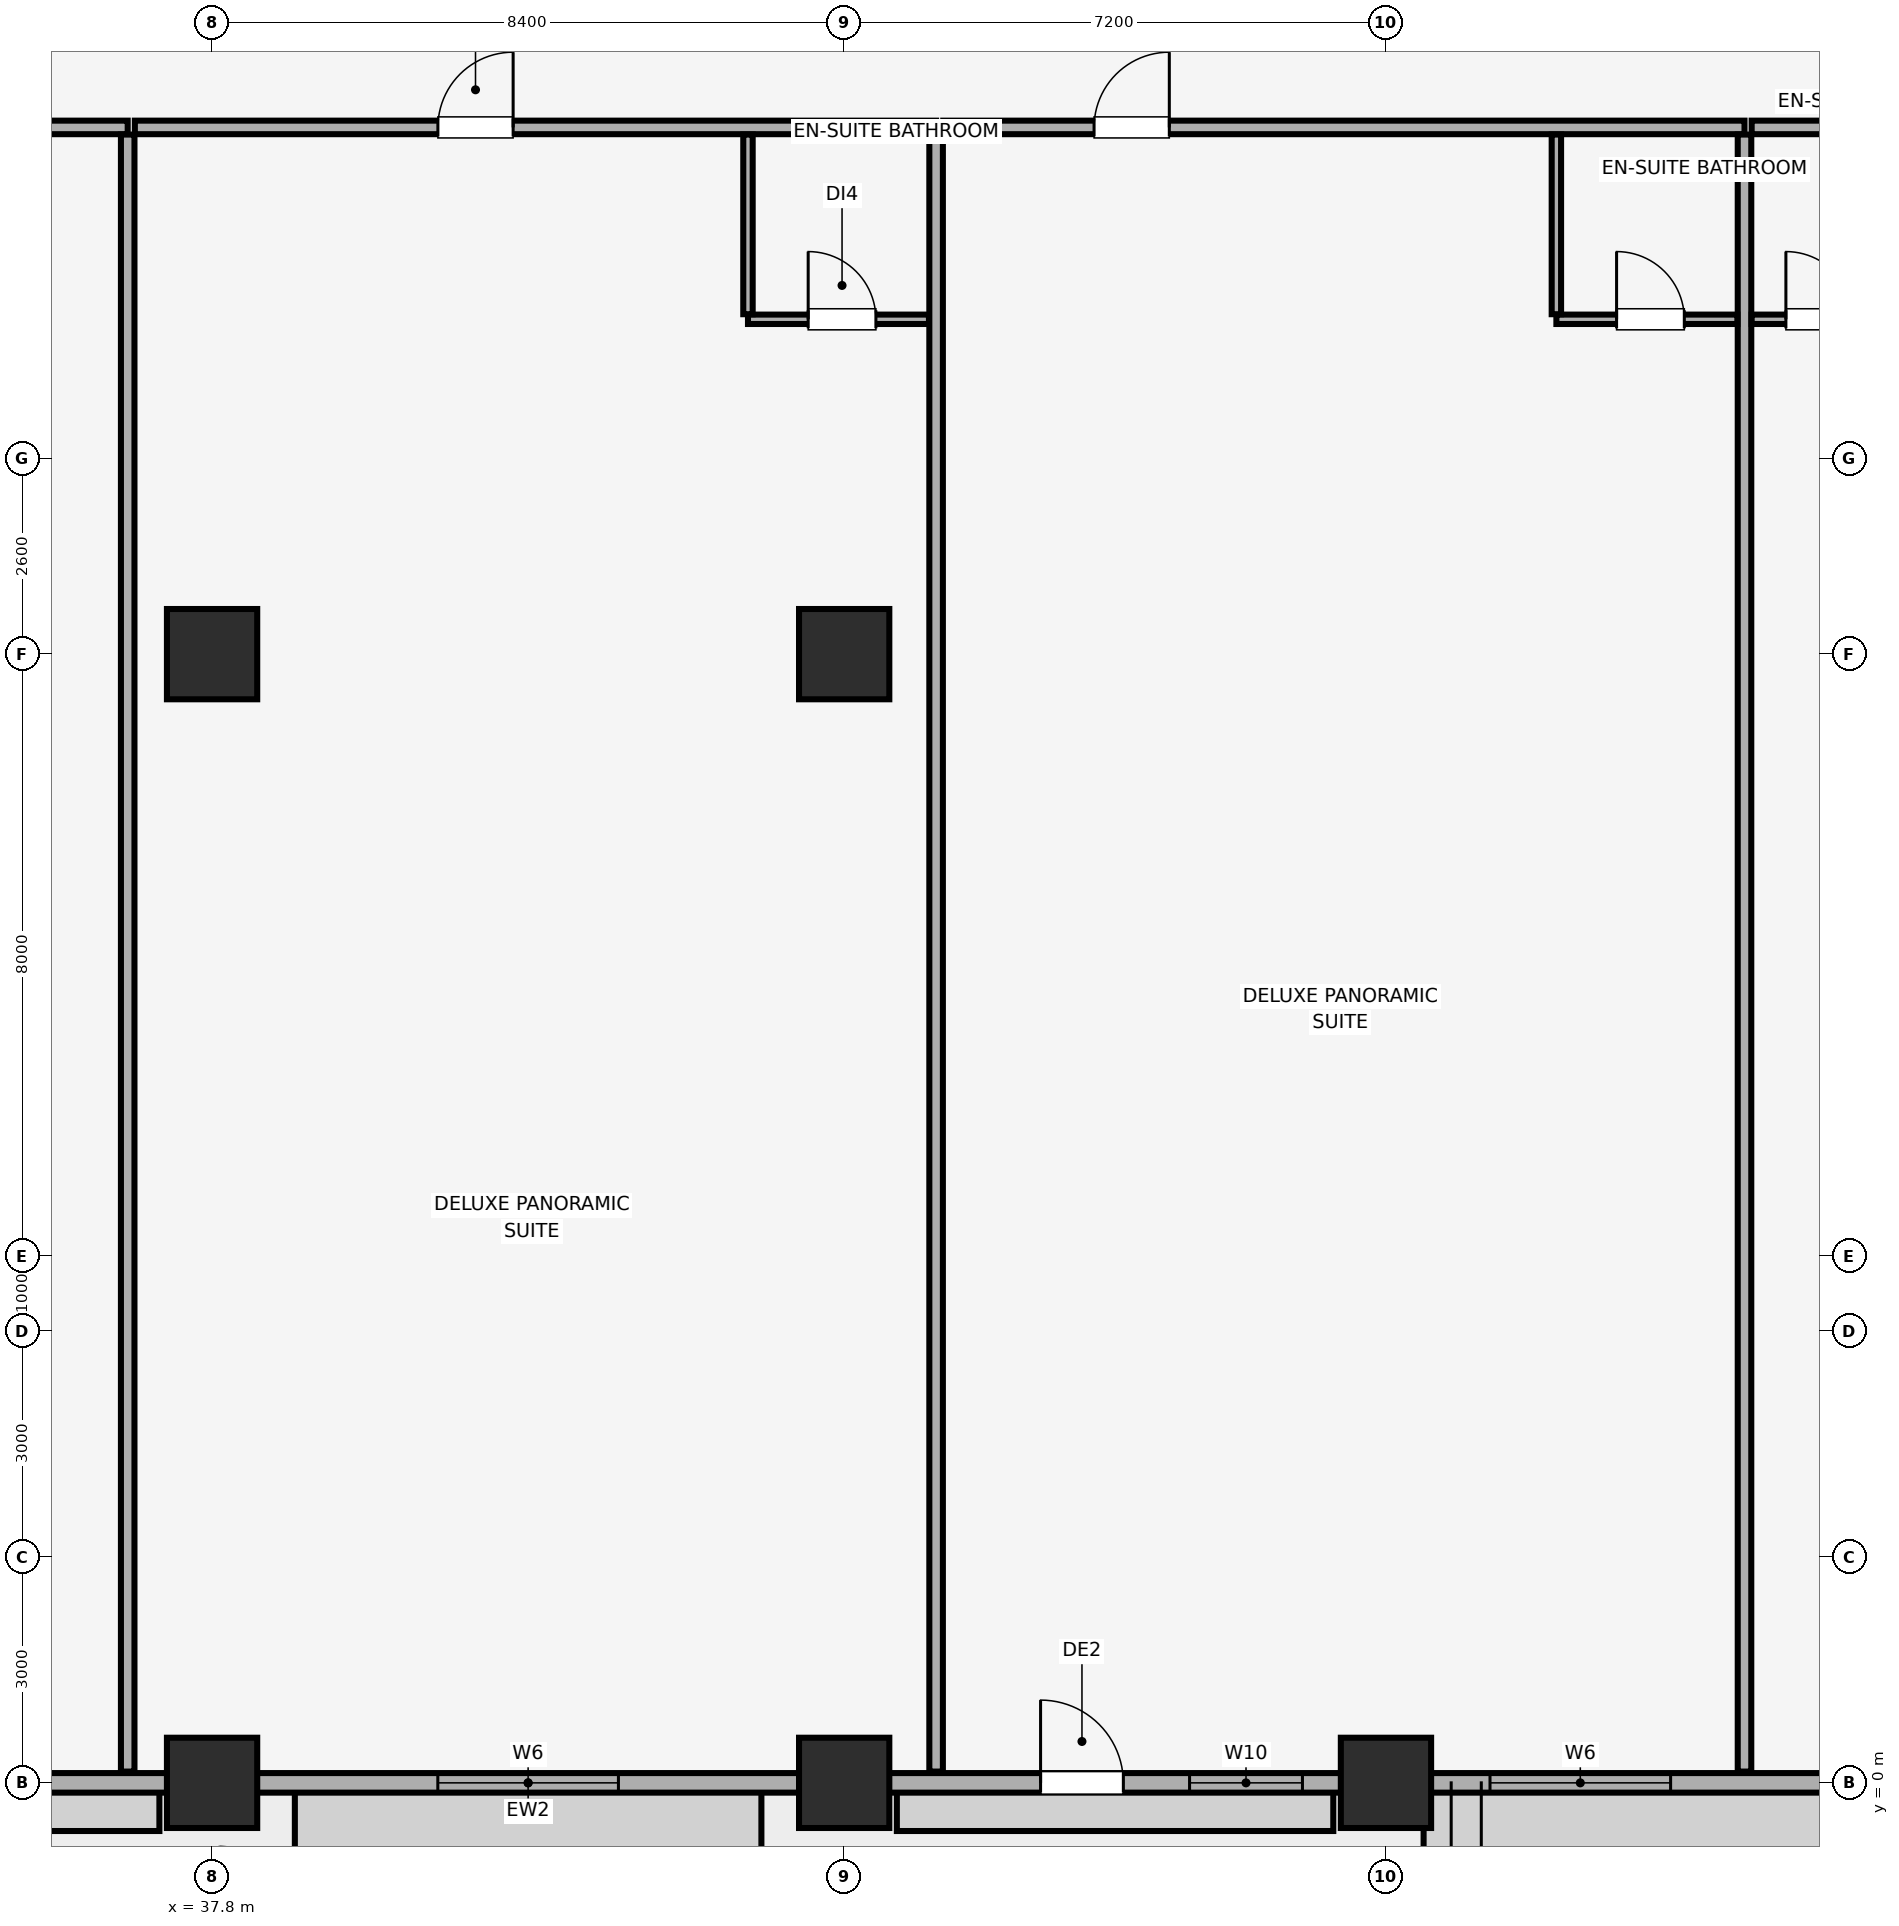
"""IFC4 building model, lengths in metres.
Left out: names, types, materials, properties, quantities, classifications, styles, units other than length and angle.
Written with IfcOpenShell. Run it as: python <this file> out.ifc"""

import sys

from ifc_helpers import new_model, si_unit, direction, frame, frame_2d, origin, origin_2d, place, context, subcontext, project, spatial, rectangle, extrude, element, fill, save


model = new_model("IFC4")
c1 = context("Model", 3, precision=1e-05, world=origin(), true_north=direction((0.0, 1.0)))
c2 = subcontext(c1, "Body", "Model", "MODEL_VIEW")
j1 = project(units=[si_unit("LENGTHUNIT", "METRE"), si_unit("PLANEANGLEUNIT", "RADIAN")], contexts=[c1])
p1 = place(None, origin())
s1 = spatial("IfcSite", under=j1, at=p1, CompositionType="ELEMENT")
p2 = place(p1, origin())
s2 = spatial("IfcBuilding", under=s1, at=p2, CompositionType="ELEMENT")
p3 = place(p2, frame((0.0, 0.0, 104.3)))
s3 = spatial("IfcBuildingStorey", under=s2, at=p3, CompositionType="ELEMENT", Elevation=104.3)
for number, where, z_axis, x_axis in (
    (1, (37.8, 0.0, 0.0), (0.0, 0.0, 1.0), (1.0, 0.0, 0.0)),
    (2, (46.2, 0.0, 0.0), (0.0, 0.0, 1.0), (1.0, 0.0, 0.0)),
    (3, (53.4, 0.0, 0.0), (0.0, 0.0, 1.0), (1.0, 0.0, 0.0)),
    (4, (37.8, 15.0, 0.0), (0.0, 0.0, 1.0), (1.0, 0.0, 0.0)),
    (5, (46.2, 15.0, 0.0), (0.0, 0.0, 1.0), (1.0, 0.0, 0.0)),
):
    element("IfcColumn", number, at=place(p3, frame(where, z_axis=z_axis, x_axis=x_axis)), inside=s3, PredefinedType="COLUMN", context=c2, shape_type="SweptSolid", body=[
        extrude(rectangle(XDim=1.2, YDim=1.2, at=origin_2d()), origin(), (0.0, 0.0, 1.0), 3.51),
    ])
p4 = place(p3, frame((4.2, 0.0, 0.0), z_axis=(0.0, 0.0, 1.0), x_axis=(1.0, 0.0, 0.0)))
e6 = element("IfcWall", 6, at=p4, inside=s3, PredefinedType="SOLIDWALL", context=c2, shape_type="SweptSolid", body=[
    extrude(rectangle(XDim=75.6, YDim=0.26, at=frame_2d((37.8, 0.0))), origin(), (0.0, 0.0, 1.0), 2.56),
])
p5 = place(p4, frame((22.948, 0.0, 0.0)))
e7 = element("IfcOpeningElement", 7, at=p5, cuts=e6, PredefinedType="OPENING", context=c2, shape_type="SweptSolid", body=[
    extrude(rectangle(XDim=1.1, YDim=2.15, at=frame_2d((0.55, 1.075))), frame((0.0, 0.14, 0.0), z_axis=(0.0, -1.0, 0.0), x_axis=(1.0, 0.0, 0.0)), (0.0, 0.0, 1.0), 0.28),
])
p6 = place(p4, frame((44.61, 0.0, 0.0)))
e8 = element("IfcOpeningElement", 8, at=p6, cuts=e6, PredefinedType="OPENING", context=c2, shape_type="SweptSolid", body=[
    extrude(rectangle(XDim=1.1, YDim=2.15, at=frame_2d((0.55, 1.075))), frame((0.0, 0.14, 0.0), z_axis=(0.0, -1.0, 0.0), x_axis=(1.0, 0.0, 0.0)), (0.0, 0.0, 1.0), 0.28),
])
p7 = place(p4, frame((66.272, 0.0, 0.0)))
e9 = element("IfcOpeningElement", 9, at=p7, cuts=e6, PredefinedType="OPENING", context=c2, shape_type="SweptSolid", body=[
    extrude(rectangle(XDim=1.1, YDim=2.15, at=frame_2d((0.55, 1.075))), frame((0.0, 0.14, 0.0), z_axis=(0.0, -1.0, 0.0), x_axis=(1.0, 0.0, 0.0)), (0.0, 0.0, 1.0), 0.28),
])
p8 = place(p4, frame((1.035, 0.0, 0.85)))
e10 = element("IfcOpeningElement", 10, at=p8, cuts=e6, PredefinedType="OPENING", context=c2, shape_type="SweptSolid", body=[
    extrude(rectangle(XDim=2.4, YDim=1.5, at=frame_2d((1.2, 0.75))), frame((0.0, 0.14, 0.0), z_axis=(0.0, -1.0, 0.0), x_axis=(1.0, 0.0, 0.0)), (0.0, 0.0, 1.0), 0.28),
])
p9 = place(p4, frame((6.896, 0.0, 0.85)))
e11 = element("IfcOpeningElement", 11, at=p9, cuts=e6, PredefinedType="OPENING", context=c2, shape_type="SweptSolid", body=[
    extrude(rectangle(XDim=2.4, YDim=1.5, at=frame_2d((1.2, 0.75))), frame((0.0, 0.14, 0.0), z_axis=(0.0, -1.0, 0.0), x_axis=(1.0, 0.0, 0.0)), (0.0, 0.0, 1.0), 0.28),
])
p10 = place(p4, frame((14.4, 0.0, 0.85)))
e12 = element("IfcOpeningElement", 12, at=p10, cuts=e6, PredefinedType="OPENING", context=c2, shape_type="SweptSolid", body=[
    extrude(rectangle(XDim=2.4, YDim=1.5, at=frame_2d((1.2, 0.75))), frame((0.0, 0.14, 0.0), z_axis=(0.0, -1.0, 0.0), x_axis=(1.0, 0.0, 0.0)), (0.0, 0.0, 1.0), 0.28),
])
p11 = place(p4, frame((28.439, 0.0, 0.85)))
e13 = element("IfcOpeningElement", 13, at=p11, cuts=e6, PredefinedType="OPENING", context=c2, shape_type="SweptSolid", body=[
    extrude(rectangle(XDim=2.4, YDim=1.5, at=frame_2d((1.2, 0.75))), frame((0.0, 0.14, 0.0), z_axis=(0.0, -1.0, 0.0), x_axis=(1.0, 0.0, 0.0)), (0.0, 0.0, 1.0), 0.28),
])
p12 = place(p4, frame((36.6, 0.0, 0.85)))
e14 = element("IfcOpeningElement", 14, at=p12, cuts=e6, PredefinedType="OPENING", context=c2, shape_type="SweptSolid", body=[
    extrude(rectangle(XDim=2.4, YDim=1.5, at=frame_2d((1.2, 0.75))), frame((0.0, 0.14, 0.0), z_axis=(0.0, -1.0, 0.0), x_axis=(1.0, 0.0, 0.0)), (0.0, 0.0, 1.0), 0.28),
])
p13 = place(p4, frame((46.59, 0.0, 0.85)))
e15 = element("IfcOpeningElement", 15, at=p13, cuts=e6, PredefinedType="OPENING", context=c2, shape_type="SweptSolid", body=[
    extrude(rectangle(XDim=1.5, YDim=1.4, at=frame_2d((0.75, 0.7))), frame((0.0, 0.14, 0.0), z_axis=(0.0, -1.0, 0.0), x_axis=(1.0, 0.0, 0.0)), (0.0, 0.0, 1.0), 0.28),
])
p14 = place(p4, frame((50.583, 0.0, 0.85)))
e16 = element("IfcOpeningElement", 16, at=p14, cuts=e6, PredefinedType="OPENING", context=c2, shape_type="SweptSolid", body=[
    extrude(rectangle(XDim=2.4, YDim=1.5, at=frame_2d((1.2, 0.75))), frame((0.0, 0.14, 0.0), z_axis=(0.0, -1.0, 0.0), x_axis=(1.0, 0.0, 0.0)), (0.0, 0.0, 1.0), 0.28),
])
p15 = place(p4, frame((58.8, 0.0, 0.85)))
e17 = element("IfcOpeningElement", 17, at=p15, cuts=e6, PredefinedType="OPENING", context=c2, shape_type="SweptSolid", body=[
    extrude(rectangle(XDim=2.4, YDim=1.5, at=frame_2d((1.2, 0.75))), frame((0.0, 0.14, 0.0), z_axis=(0.0, -1.0, 0.0), x_axis=(1.0, 0.0, 0.0)), (0.0, 0.0, 1.0), 0.28),
])
p16 = place(p4, frame((68.221, 0.0, 0.85)))
e18 = element("IfcOpeningElement", 18, at=p16, cuts=e6, PredefinedType="OPENING", context=c2, shape_type="SweptSolid", body=[
    extrude(rectangle(XDim=1.5, YDim=1.4, at=frame_2d((0.75, 0.7))), frame((0.0, 0.14, 0.0), z_axis=(0.0, -1.0, 0.0), x_axis=(1.0, 0.0, 0.0)), (0.0, 0.0, 1.0), 0.28),
])
p17 = place(p4, frame((72.165, 0.0, 0.85)))
e19 = element("IfcOpeningElement", 19, at=p17, cuts=e6, PredefinedType="OPENING", context=c2, shape_type="SweptSolid", body=[
    extrude(rectangle(XDim=2.4, YDim=1.5, at=frame_2d((1.2, 0.75))), frame((0.0, 0.14, 0.0), z_axis=(0.0, -1.0, 0.0), x_axis=(1.0, 0.0, 0.0)), (0.0, 0.0, 1.0), 0.28),
])
p18 = place(p3, frame((26.031, 22.0, 0.0), z_axis=(0.0, 0.0, 1.0), x_axis=(1.0, 0.0, 0.0)))
e20 = element("IfcWall", 20, at=p18, inside=s3, PredefinedType="PARTITIONING", context=c2, shape_type="SweptSolid", body=[
    extrude(rectangle(XDim=10.648, YDim=0.18, at=frame_2d((5.324, 0.0))), origin(), (0.0, 0.0, 1.0), 3.51),
])
p19 = place(p18, frame((7.499, 0.0, 0.0)))
e21 = element("IfcOpeningElement", 21, at=p19, cuts=e20, PredefinedType="OPENING", context=c2, shape_type="SweptSolid", body=[
    extrude(rectangle(XDim=1.0, YDim=2.15, at=frame_2d((0.5, 1.075))), frame((0.0, 0.1, 0.0), z_axis=(0.0, -1.0, 0.0), x_axis=(1.0, 0.0, 0.0)), (0.0, 0.0, 1.0), 0.2),
])
p20 = place(p3, frame((36.679, 0.15, 0.0), z_axis=(0.0, 0.0, 1.0), x_axis=(0.0, 1.0, 0.0)))
e22 = element("IfcWall", 22, at=p20, inside=s3, PredefinedType="PARTITIONING", context=c2, shape_type="SweptSolid", body=[
    extrude(rectangle(XDim=21.755, YDim=0.18, at=frame_2d((10.877, 0.0))), origin(), (0.0, 0.0, 1.0), 3.51),
])
p21 = place(p3, frame((36.774, 22.0, 0.0), z_axis=(0.0, 0.0, 1.0), x_axis=(1.0, 0.0, 0.0)))
e23 = element("IfcWall", 23, at=p21, inside=s3, PredefinedType="PARTITIONING", context=c2, shape_type="SweptSolid", body=[
    extrude(rectangle(XDim=10.648, YDim=0.18, at=frame_2d((5.324, 0.0))), origin(), (0.0, 0.0, 1.0), 3.51),
])
p22 = place(p21, frame((4.027, 0.0, 0.0)))
e24 = element("IfcOpeningElement", 24, at=p22, cuts=e23, PredefinedType="OPENING", context=c2, shape_type="SweptSolid", body=[
    extrude(rectangle(XDim=1.0, YDim=2.15, at=frame_2d((0.5, 1.075))), frame((0.0, 0.1, 0.0), z_axis=(0.0, -1.0, 0.0), x_axis=(1.0, 0.0, 0.0)), (0.0, 0.0, 1.0), 0.2),
])
p23 = place(p3, frame((47.422, 0.15, 0.0), z_axis=(0.0, 0.0, 1.0), x_axis=(0.0, 1.0, 0.0)))
e25 = element("IfcWall", 25, at=p23, inside=s3, PredefinedType="PARTITIONING", context=c2, shape_type="SweptSolid", body=[
    extrude(rectangle(XDim=21.755, YDim=0.18, at=frame_2d((10.877, 0.0))), origin(), (0.0, 0.0, 1.0), 3.51),
])
p24 = place(p3, frame((44.922, 19.45, 0.0), z_axis=(0.0, 0.0, 1.0), x_axis=(1.0, 0.0, 0.0)))
e26 = element("IfcWall", 26, at=p24, inside=s3, PredefinedType="PARTITIONING", context=c2, shape_type="SweptSolid", body=[
    extrude(rectangle(XDim=2.405, YDim=0.125, at=frame_2d((1.203, 0.0))), origin(), (0.0, 0.0, 1.0), 3.51),
])
p25 = place(p24, frame((0.8, 0.0, 0.0)))
e27 = element("IfcOpeningElement", 27, at=p25, cuts=e26, PredefinedType="OPENING", context=c2, shape_type="SweptSolid", body=[
    extrude(rectangle(XDim=0.9, YDim=2.1, at=frame_2d((0.45, 1.05))), frame((0.0, 0.073, 0.0), z_axis=(0.0, -1.0, 0.0), x_axis=(1.0, 0.0, 0.0)), (0.0, 0.0, 1.0), 0.145),
])
p26 = place(p3, frame((44.922, 19.518, 0.0), z_axis=(0.0, 0.0, 1.0), x_axis=(0.0, 1.0, 0.0)))
e28 = element("IfcWall", 28, at=p26, inside=s3, PredefinedType="PARTITIONING", context=c2, shape_type="SweptSolid", body=[
    extrude(rectangle(XDim=2.387, YDim=0.125, at=frame_2d((1.194, 0.0))), origin(), (0.0, 0.0, 1.0), 3.51),
])
p27 = place(p3, frame((47.517, 22.0, 0.0), z_axis=(0.0, 0.0, 1.0), x_axis=(1.0, 0.0, 0.0)))
e29 = element("IfcWall", 29, at=p27, inside=s3, PredefinedType="PARTITIONING", context=c2, shape_type="SweptSolid", body=[
    extrude(rectangle(XDim=10.648, YDim=0.18, at=frame_2d((5.324, 0.0))), origin(), (0.0, 0.0, 1.0), 3.51),
])
p28 = place(p27, frame((2.004, 0.0, 0.0)))
e30 = element("IfcOpeningElement", 30, at=p28, cuts=e29, PredefinedType="OPENING", context=c2, shape_type="SweptSolid", body=[
    extrude(rectangle(XDim=1.0, YDim=2.15, at=frame_2d((0.5, 1.075))), frame((0.0, 0.1, 0.0), z_axis=(0.0, -1.0, 0.0), x_axis=(1.0, 0.0, 0.0)), (0.0, 0.0, 1.0), 0.2),
])
p29 = place(p3, frame((58.165, 0.15, 0.0), z_axis=(0.0, 0.0, 1.0), x_axis=(0.0, 1.0, 0.0)))
e31 = element("IfcWall", 31, at=p29, inside=s3, PredefinedType="PARTITIONING", context=c2, shape_type="SweptSolid", body=[
    extrude(rectangle(XDim=21.755, YDim=0.18, at=frame_2d((10.877, 0.0))), origin(), (0.0, 0.0, 1.0), 3.51),
])
p30 = place(p3, frame((55.665, 19.45, 0.0), z_axis=(0.0, 0.0, 1.0), x_axis=(1.0, 0.0, 0.0)))
e32 = element("IfcWall", 32, at=p30, inside=s3, PredefinedType="PARTITIONING", context=c2, shape_type="SweptSolid", body=[
    extrude(rectangle(XDim=2.405, YDim=0.125, at=frame_2d((1.203, 0.0))), origin(), (0.0, 0.0, 1.0), 3.51),
])
p31 = place(p30, frame((0.8, 0.0, 0.0)))
e33 = element("IfcOpeningElement", 33, at=p31, cuts=e32, PredefinedType="OPENING", context=c2, shape_type="SweptSolid", body=[
    extrude(rectangle(XDim=0.9, YDim=2.1, at=frame_2d((0.45, 1.05))), frame((0.0, 0.073, 0.0), z_axis=(0.0, -1.0, 0.0), x_axis=(1.0, 0.0, 0.0)), (0.0, 0.0, 1.0), 0.145),
])
p32 = place(p3, frame((55.665, 19.518, 0.0), z_axis=(0.0, 0.0, 1.0), x_axis=(0.0, 1.0, 0.0)))
e34 = element("IfcWall", 34, at=p32, inside=s3, PredefinedType="PARTITIONING", context=c2, shape_type="SweptSolid", body=[
    extrude(rectangle(XDim=2.387, YDim=0.125, at=frame_2d((1.194, 0.0))), origin(), (0.0, 0.0, 1.0), 3.51),
])
p33 = place(p3, frame((58.26, 22.0, 0.0), z_axis=(0.0, 0.0, 1.0), x_axis=(1.0, 0.0, 0.0)))
e35 = element("IfcWall", 35, at=p33, inside=s3, PredefinedType="PARTITIONING", context=c2, shape_type="SweptSolid", body=[
    extrude(rectangle(XDim=10.648, YDim=0.18, at=frame_2d((5.324, 0.0))), origin(), (0.0, 0.0, 1.0), 3.51),
])
p34 = place(p33, frame((5.533, 0.0, 0.0)))
e36 = element("IfcOpeningElement", 36, at=p34, cuts=e35, PredefinedType="OPENING", context=c2, shape_type="SweptSolid", body=[
    extrude(rectangle(XDim=1.0, YDim=2.15, at=frame_2d((0.5, 1.075))), frame((0.0, 0.1, 0.0), z_axis=(0.0, -1.0, 0.0), x_axis=(1.0, 0.0, 0.0)), (0.0, 0.0, 1.0), 0.2),
])
p35 = place(p3, frame((58.26, 19.45, 0.0), z_axis=(0.0, 0.0, 1.0), x_axis=(1.0, 0.0, 0.0)))
e37 = element("IfcWall", 37, at=p35, inside=s3, PredefinedType="PARTITIONING", context=c2, shape_type="SweptSolid", body=[
    extrude(rectangle(XDim=2.405, YDim=0.125, at=frame_2d((1.203, 0.0))), origin(), (0.0, 0.0, 1.0), 3.51),
])
p36 = place(p35, frame((0.455, 0.0, 0.0)))
e38 = element("IfcOpeningElement", 38, at=p36, cuts=e37, PredefinedType="OPENING", context=c2, shape_type="SweptSolid", body=[
    extrude(rectangle(XDim=0.9, YDim=2.1, at=frame_2d((0.45, 1.05))), frame((0.0, 0.073, 0.0), z_axis=(0.0, -1.0, 0.0), x_axis=(1.0, 0.0, 0.0)), (0.0, 0.0, 1.0), 0.145),
])
p37 = place(p6, origin())
e39 = element("IfcDoor", 39, at=p37, inside=s3, OperationType="SINGLE_SWING_LEFT", PredefinedType="DOOR", context=c2, shape_type="SweptSolid", body=[
    extrude(rectangle(XDim=1.1, YDim=2.15, at=frame_2d((0.55, 1.075))), frame((0.0, 0.025, 0.0), z_axis=(0.0, -1.0, 0.0), x_axis=(1.0, 0.0, 0.0)), (0.0, 0.0, 1.0), 0.05),
])
fill(e8, e39)
p38 = place(p12, origin())
e40 = element("IfcWindow", 40, at=p38, inside=s3, PartitioningType="SINGLE_PANEL", PredefinedType="WINDOW", context=c2, shape_type="SweptSolid", body=[
    extrude(rectangle(XDim=2.4, YDim=1.5, at=frame_2d((1.2, 0.75))), frame((0.0, 0.03, 0.0), z_axis=(0.0, -1.0, 0.0), x_axis=(1.0, 0.0, 0.0)), (0.0, 0.0, 1.0), 0.06),
])
fill(e14, e40)
p39 = place(p13, origin())
e41 = element("IfcWindow", 41, at=p39, inside=s3, PartitioningType="SINGLE_PANEL", PredefinedType="WINDOW", context=c2, shape_type="SweptSolid", body=[
    extrude(rectangle(XDim=1.5, YDim=1.4, at=frame_2d((0.75, 0.7))), frame((0.0, 0.03, 0.0), z_axis=(0.0, -1.0, 0.0), x_axis=(1.0, 0.0, 0.0)), (0.0, 0.0, 1.0), 0.06),
])
fill(e15, e41)
p40 = place(p14, origin())
e42 = element("IfcWindow", 42, at=p40, inside=s3, PartitioningType="SINGLE_PANEL", PredefinedType="WINDOW", context=c2, shape_type="SweptSolid", body=[
    extrude(rectangle(XDim=2.4, YDim=1.5, at=frame_2d((1.2, 0.75))), frame((0.0, 0.03, 0.0), z_axis=(0.0, -1.0, 0.0), x_axis=(1.0, 0.0, 0.0)), (0.0, 0.0, 1.0), 0.06),
])
fill(e16, e42)
p41 = place(p22, origin())
e43 = element("IfcDoor", 43, at=p41, inside=s3, OperationType="SINGLE_SWING_RIGHT", PredefinedType="DOOR", context=c2, shape_type="SweptSolid", body=[
    extrude(rectangle(XDim=1.0, YDim=2.15, at=frame_2d((0.5, 1.075))), frame((0.0, 0.025, 0.0), z_axis=(0.0, -1.0, 0.0), x_axis=(1.0, 0.0, 0.0)), (0.0, 0.0, 1.0), 0.05),
])
fill(e24, e43)
p42 = place(p25, origin())
e44 = element("IfcDoor", 44, at=p42, inside=s3, OperationType="SINGLE_SWING_LEFT", PredefinedType="DOOR", context=c2, shape_type="SweptSolid", body=[
    extrude(rectangle(XDim=0.9, YDim=2.1, at=frame_2d((0.45, 1.05))), frame((0.0, 0.025, 0.0), z_axis=(0.0, -1.0, 0.0), x_axis=(1.0, 0.0, 0.0)), (0.0, 0.0, 1.0), 0.05),
])
fill(e27, e44)
p43 = place(p28, origin())
e45 = element("IfcDoor", 45, at=p43, inside=s3, OperationType="SINGLE_SWING_RIGHT", PredefinedType="DOOR", context=c2, shape_type="SweptSolid", body=[
    extrude(rectangle(XDim=1.0, YDim=2.15, at=frame_2d((0.5, 1.075))), frame((0.0, 0.025, 0.0), z_axis=(0.0, -1.0, 0.0), x_axis=(1.0, 0.0, 0.0)), (0.0, 0.0, 1.0), 0.05),
])
fill(e30, e45)
p44 = place(p31, origin())
e46 = element("IfcDoor", 46, at=p44, inside=s3, OperationType="SINGLE_SWING_LEFT", PredefinedType="DOOR", context=c2, shape_type="SweptSolid", body=[
    extrude(rectangle(XDim=0.9, YDim=2.1, at=frame_2d((0.45, 1.05))), frame((0.0, 0.025, 0.0), z_axis=(0.0, -1.0, 0.0), x_axis=(1.0, 0.0, 0.0)), (0.0, 0.0, 1.0), 0.05),
])
fill(e33, e46)
p45 = place(p36, origin())
e47 = element("IfcDoor", 47, at=p45, inside=s3, OperationType="SINGLE_SWING_LEFT", PredefinedType="DOOR", context=c2, shape_type="SweptSolid", body=[
    extrude(rectangle(XDim=0.9, YDim=2.1, at=frame_2d((0.45, 1.05))), frame((0.0, 0.025, 0.0), z_axis=(0.0, -1.0, 0.0), x_axis=(1.0, 0.0, 0.0)), (0.0, 0.0, 1.0), 0.05),
])
fill(e38, e47)
save(model, sys.argv[1])
